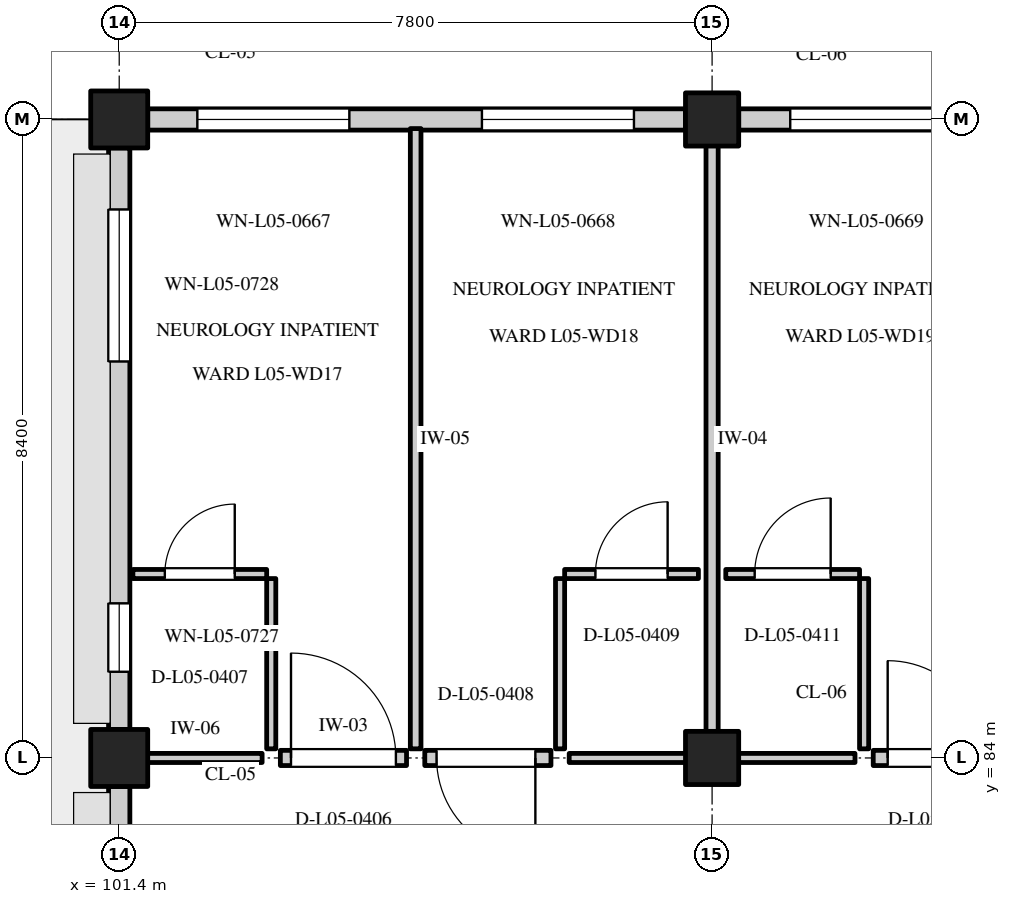
"""IFC4 building model, lengths in metres.
Left out: names, types, materials, properties, quantities, classifications, styles, units other than length and angle.
Written with IfcOpenShell. Run it as: python <this file> out.ifc"""

import sys

from ifc_helpers import new_model, si_unit, direction, frame, frame_2d, origin, origin_2d, place, context, subcontext, project, spatial, rectangle, extrude, element, fill, save


model = new_model("IFC4")
c1 = context("Model", 3, precision=1e-05, world=origin(), true_north=direction((0.0, 1.0)))
c2 = subcontext(c1, "Body", "Model", "MODEL_VIEW")
j1 = project(units=[si_unit("LENGTHUNIT", "METRE"), si_unit("PLANEANGLEUNIT", "RADIAN")], contexts=[c1])
p1 = place(None, origin())
s1 = spatial("IfcSite", under=j1, at=p1, CompositionType="ELEMENT")
p2 = place(p1, origin())
s2 = spatial("IfcBuilding", under=s1, at=p2, CompositionType="ELEMENT")
p3 = place(p2, frame((0.0, 0.0, 22.2)))
s3 = spatial("IfcBuildingStorey", under=s2, at=p3, CompositionType="ELEMENT", Elevation=22.2)
for number, where, z_axis, x_axis in (
    (1, (101.4, 84.0, 0.0), (0.0, 0.0, 1.0), (1.0, 0.0, 0.0)),
    (2, (101.4, 92.4, 0.0), (0.0, 0.0, 1.0), (1.0, 0.0, 0.0)),
):
    element("IfcColumn", number, at=place(p3, frame(where, z_axis=z_axis, x_axis=x_axis)), inside=s3, PredefinedType="COLUMN", context=c2, shape_type="SweptSolid", body=[
        extrude(rectangle(XDim=0.75, YDim=0.75, at=origin_2d()), origin(), (0.0, 0.0, 1.0), 3.9),
    ])
for number, where, z_axis, x_axis in (
    (3, (109.2, 84.0, 0.0), (0.0, 0.0, 1.0), (1.0, 0.0, 0.0)),
    (4, (109.2, 92.4, 0.0), (0.0, 0.0, 1.0), (1.0, 0.0, 0.0)),
):
    element("IfcColumn", number, at=place(p3, frame(where, z_axis=z_axis, x_axis=x_axis)), inside=s3, PredefinedType="COLUMN", context=c2, shape_type="SweptSolid", body=[
        extrude(rectangle(XDim=0.7, YDim=0.7, at=origin_2d()), origin(), (0.0, 0.0, 1.0), 3.9),
    ])
p4 = place(p3, frame((101.775, 92.4, 0.0), z_axis=(0.0, 0.0, 1.0), x_axis=(1.0, 0.0, 0.0)))
e5 = element("IfcWall", 5, at=p4, inside=s3, PredefinedType="STANDARD", context=c2, shape_type="SweptSolid", body=[
    extrude(rectangle(XDim=7.075, YDim=0.28, at=frame_2d((3.538, 0.0))), origin(), (0.0, 0.0, 1.0), 3.05),
])
p5 = place(p4, frame((0.653, 0.0, 0.8)))
e6 = element("IfcOpeningElement", 6, at=p5, cuts=e5, PredefinedType="OPENING", context=c2, shape_type="SweptSolid", body=[
    extrude(rectangle(XDim=2.0, YDim=1.55, at=frame_2d((1.0, 0.775))), frame((0.0, 0.152, 0.0), z_axis=(0.0, -1.0, 0.0), x_axis=(1.0, 0.0, 0.0)), (0.0, 0.0, 1.0), 0.304),
])
p6 = place(p4, frame((4.397, 0.0, 0.8)))
e7 = element("IfcOpeningElement", 7, at=p6, cuts=e5, PredefinedType="OPENING", context=c2, shape_type="SweptSolid", body=[
    extrude(rectangle(XDim=2.0, YDim=1.55, at=frame_2d((1.0, 0.775))), frame((0.0, 0.152, 0.0), z_axis=(0.0, -1.0, 0.0), x_axis=(1.0, 0.0, 0.0)), (0.0, 0.0, 1.0), 0.304),
])
p7 = place(p3, frame((109.55, 92.4, 0.0), z_axis=(0.0, 0.0, 1.0), x_axis=(1.0, 0.0, 0.0)))
e8 = element("IfcWall", 8, at=p7, inside=s3, PredefinedType="STANDARD", context=c2, shape_type="SweptSolid", body=[
    extrude(rectangle(XDim=7.1, YDim=0.28, at=frame_2d((3.55, 0.0))), origin(), (0.0, 0.0, 1.0), 3.05),
])
p8 = place(p7, frame((0.678, 0.0, 0.8)))
e9 = element("IfcOpeningElement", 9, at=p8, cuts=e8, PredefinedType="OPENING", context=c2, shape_type="SweptSolid", body=[
    extrude(rectangle(XDim=2.0, YDim=1.45, at=frame_2d((1.0, 0.725))), frame((0.0, 0.152, 0.0), z_axis=(0.0, -1.0, 0.0), x_axis=(1.0, 0.0, 0.0)), (0.0, 0.0, 1.0), 0.304),
])
p9 = place(p7, frame((4.422, 0.0, 0.8)))
e10 = element("IfcOpeningElement", 10, at=p9, cuts=e8, PredefinedType="OPENING", context=c2, shape_type="SweptSolid", body=[
    extrude(rectangle(XDim=2.0, YDim=1.45, at=frame_2d((1.0, 0.725))), frame((0.0, 0.152, 0.0), z_axis=(0.0, -1.0, 0.0), x_axis=(1.0, 0.0, 0.0)), (0.0, 0.0, 1.0), 0.304),
])
p10 = place(p3, frame((101.4, 75.975, 0.0), z_axis=(0.0, 0.0, 1.0), x_axis=(0.0, 1.0, 0.0)))
e11 = element("IfcWall", 11, at=p10, inside=s3, PredefinedType="STANDARD", context=c2, shape_type="SweptSolid", body=[
    extrude(rectangle(XDim=7.65, YDim=0.28, at=frame_2d((3.825, 0.0))), origin(), (0.0, 0.0, 1.0), 2.95),
])
p11 = place(p10, frame((0.809, 0.0, 0.8)))
e12 = element("IfcOpeningElement", 12, at=p11, cuts=e11, PredefinedType="OPENING", context=c2, shape_type="SweptSolid", body=[
    extrude(rectangle(XDim=2.0, YDim=1.75, at=frame_2d((1.0, 0.875))), frame((0.0, 0.152, 0.0), z_axis=(0.0, -1.0, 0.0), x_axis=(1.0, 0.0, 0.0)), (0.0, 0.0, 1.0), 0.304),
])
p12 = place(p10, frame((4.841, 0.0, 0.8)))
e13 = element("IfcOpeningElement", 13, at=p12, cuts=e11, PredefinedType="OPENING", context=c2, shape_type="SweptSolid", body=[
    extrude(rectangle(XDim=2.0, YDim=1.75, at=frame_2d((1.0, 0.875))), frame((0.0, 0.152, 0.0), z_axis=(0.0, -1.0, 0.0), x_axis=(1.0, 0.0, 0.0)), (0.0, 0.0, 1.0), 0.304),
])
p13 = place(p3, frame((101.4, 84.375, 0.0), z_axis=(0.0, 0.0, 1.0), x_axis=(0.0, 1.0, 0.0)))
e14 = element("IfcWall", 14, at=p13, inside=s3, PredefinedType="STANDARD", context=c2, shape_type="SweptSolid", body=[
    extrude(rectangle(XDim=7.65, YDim=0.28, at=frame_2d((3.825, 0.0))), origin(), (0.0, 0.0, 1.0), 2.95),
])
p14 = place(p13, frame((0.759, 0.0, 0.8)))
e15 = element("IfcOpeningElement", 15, at=p14, cuts=e14, PredefinedType="OPENING", context=c2, shape_type="SweptSolid", body=[
    extrude(rectangle(XDim=0.9, YDim=1.3, at=frame_2d((0.45, 0.65))), frame((0.0, 0.152, 0.0), z_axis=(0.0, -1.0, 0.0), x_axis=(1.0, 0.0, 0.0)), (0.0, 0.0, 1.0), 0.304),
])
p15 = place(p13, frame((4.841, 0.0, 0.8)))
e16 = element("IfcOpeningElement", 16, at=p15, cuts=e14, PredefinedType="OPENING", context=c2, shape_type="SweptSolid", body=[
    extrude(rectangle(XDim=2.0, YDim=1.65, at=frame_2d((1.0, 0.825))), frame((0.0, 0.152, 0.0), z_axis=(0.0, -1.0, 0.0), x_axis=(1.0, 0.0, 0.0)), (0.0, 0.0, 1.0), 0.304),
])
p16 = place(p3, frame((105.3, 84.12, 0.0), z_axis=(0.0, 0.0, 1.0), x_axis=(0.0, 1.0, 0.0)))
e17 = element("IfcWall", 17, at=p16, inside=s3, PredefinedType="PARTITIONING", context=c2, shape_type="SweptSolid", body=[
    extrude(rectangle(XDim=8.16, YDim=0.14, at=frame_2d((4.08, 0.0))), origin(), (0.0, 0.0, 1.0), 3.58),
])
p17 = place(p3, frame((103.52, 84.0, 0.0), z_axis=(0.0, 0.0, 1.0), x_axis=(1.0, 0.0, 0.0)))
e18 = element("IfcWall", 18, at=p17, inside=s3, PredefinedType="STANDARD", context=c2, shape_type="SweptSolid", body=[
    extrude(rectangle(XDim=1.66, YDim=0.2, at=frame_2d((0.83, 0.0))), origin(), (0.0, 0.0, 1.0), 2.95),
])
p18 = place(p17, frame((0.14, 0.0, 0.0)))
e19 = element("IfcOpeningElement", 19, at=p18, cuts=e18, PredefinedType="OPENING", context=c2, shape_type="SweptSolid", body=[
    extrude(rectangle(XDim=1.38, YDim=2.2, at=frame_2d((0.69, 1.1))), frame((0.0, 0.112, 0.0), z_axis=(0.0, -1.0, 0.0), x_axis=(1.0, 0.0, 0.0)), (0.0, 0.0, 1.0), 0.224),
])
p19 = place(p3, frame((101.52, 84.0, 0.0), z_axis=(0.0, 0.0, 1.0), x_axis=(1.0, 0.0, 0.0)))
e20 = element("IfcWall", 20, at=p19, inside=s3, PredefinedType="PARTITIONING", context=c2, shape_type="SweptSolid", body=[
    extrude(rectangle(XDim=1.76, YDim=0.12, at=frame_2d((0.88, 0.0))), origin(), (0.0, 0.0, 1.0), 2.95),
])
p20 = place(p3, frame((103.4, 84.12, 0.0), z_axis=(0.0, 0.0, 1.0), x_axis=(0.0, 1.0, 0.0)))
e21 = element("IfcWall", 21, at=p20, inside=s3, PredefinedType="PARTITIONING", context=c2, shape_type="SweptSolid", body=[
    extrude(rectangle(XDim=2.24, YDim=0.12, at=frame_2d((1.12, 0.0))), origin(), (0.0, 0.0, 1.0), 3.58),
])
p21 = place(p3, frame((101.58, 86.42, 0.0), z_axis=(0.0, 0.0, 1.0), x_axis=(1.0, 0.0, 0.0)))
e22 = element("IfcWall", 22, at=p21, inside=s3, PredefinedType="PARTITIONING", context=c2, shape_type="SweptSolid", body=[
    extrude(rectangle(XDim=1.76, YDim=0.12, at=frame_2d((0.88, 0.0))), origin(), (0.0, 0.0, 1.0), 3.58),
])
p22 = place(p21, frame((0.42, 0.0, 0.0)))
e23 = element("IfcOpeningElement", 23, at=p22, cuts=e22, PredefinedType="OPENING", context=c2, shape_type="SweptSolid", body=[
    extrude(rectangle(XDim=0.92, YDim=2.08, at=frame_2d((0.46, 1.04))), frame((0.0, 0.072, 0.0), z_axis=(0.0, -1.0, 0.0), x_axis=(1.0, 0.0, 0.0)), (0.0, 0.0, 1.0), 0.144),
])
p23 = place(p3, frame((109.2, 84.12, 0.0), z_axis=(0.0, 0.0, 1.0), x_axis=(0.0, 1.0, 0.0)))
e24 = element("IfcWall", 24, at=p23, inside=s3, PredefinedType="PARTITIONING", context=c2, shape_type="SweptSolid", body=[
    extrude(rectangle(XDim=8.16, YDim=0.16, at=frame_2d((4.08, 0.0))), origin(), (0.0, 0.0, 1.0), 3.58),
])
p24 = place(p3, frame((105.42, 84.0, 0.0), z_axis=(0.0, 0.0, 1.0), x_axis=(1.0, 0.0, 0.0)))
e25 = element("IfcWall", 25, at=p24, inside=s3, PredefinedType="STANDARD", context=c2, shape_type="SweptSolid", body=[
    extrude(rectangle(XDim=1.66, YDim=0.2, at=frame_2d((0.83, 0.0))), origin(), (0.0, 0.0, 1.0), 2.95),
])
p25 = place(p24, frame((0.155, 0.0, 0.0)))
e26 = element("IfcOpeningElement", 26, at=p25, cuts=e25, PredefinedType="OPENING", context=c2, shape_type="SweptSolid", body=[
    extrude(rectangle(XDim=1.3, YDim=2.15, at=frame_2d((0.65, 1.075))), frame((0.0, 0.112, 0.0), z_axis=(0.0, -1.0, 0.0), x_axis=(1.0, 0.0, 0.0)), (0.0, 0.0, 1.0), 0.224),
])
p26 = place(p3, frame((107.32, 84.0, 0.0), z_axis=(0.0, 0.0, 1.0), x_axis=(1.0, 0.0, 0.0)))
e27 = element("IfcWall", 27, at=p26, inside=s3, PredefinedType="PARTITIONING", context=c2, shape_type="SweptSolid", body=[
    extrude(rectangle(XDim=1.76, YDim=0.12, at=frame_2d((0.88, 0.0))), origin(), (0.0, 0.0, 1.0), 2.95),
])
p27 = place(p3, frame((107.2, 84.12, 0.0), z_axis=(0.0, 0.0, 1.0), x_axis=(0.0, 1.0, 0.0)))
e28 = element("IfcWall", 28, at=p27, inside=s3, PredefinedType="PARTITIONING", context=c2, shape_type="SweptSolid", body=[
    extrude(rectangle(XDim=2.24, YDim=0.12, at=frame_2d((1.12, 0.0))), origin(), (0.0, 0.0, 1.0), 3.58),
])
p28 = place(p3, frame((107.26, 86.42, 0.0), z_axis=(0.0, 0.0, 1.0), x_axis=(1.0, 0.0, 0.0)))
e29 = element("IfcWall", 29, at=p28, inside=s3, PredefinedType="PARTITIONING", context=c2, shape_type="SweptSolid", body=[
    extrude(rectangle(XDim=1.76, YDim=0.12, at=frame_2d((0.88, 0.0))), origin(), (0.0, 0.0, 1.0), 3.58),
])
p29 = place(p28, frame((0.405, 0.0, 0.0)))
e30 = element("IfcOpeningElement", 30, at=p29, cuts=e29, PredefinedType="OPENING", context=c2, shape_type="SweptSolid", body=[
    extrude(rectangle(XDim=0.95, YDim=2.1, at=frame_2d((0.475, 1.05))), frame((0.0, 0.072, 0.0), z_axis=(0.0, -1.0, 0.0), x_axis=(1.0, 0.0, 0.0)), (0.0, 0.0, 1.0), 0.144),
])
p30 = place(p3, frame((111.32, 84.0, 0.0), z_axis=(0.0, 0.0, 1.0), x_axis=(1.0, 0.0, 0.0)))
e31 = element("IfcWall", 31, at=p30, inside=s3, PredefinedType="STANDARD", context=c2, shape_type="SweptSolid", body=[
    extrude(rectangle(XDim=1.66, YDim=0.2, at=frame_2d((0.83, 0.0))), origin(), (0.0, 0.0, 1.0), 2.95),
])
p31 = place(p30, frame((0.19, 0.0, 0.0)))
e32 = element("IfcOpeningElement", 32, at=p31, cuts=e31, PredefinedType="OPENING", context=c2, shape_type="SweptSolid", body=[
    extrude(rectangle(XDim=1.28, YDim=2.15, at=frame_2d((0.64, 1.075))), frame((0.0, 0.112, 0.0), z_axis=(0.0, -1.0, 0.0), x_axis=(1.0, 0.0, 0.0)), (0.0, 0.0, 1.0), 0.224),
])
p32 = place(p3, frame((109.32, 84.0, 0.0), z_axis=(0.0, 0.0, 1.0), x_axis=(1.0, 0.0, 0.0)))
e33 = element("IfcWall", 33, at=p32, inside=s3, PredefinedType="PARTITIONING", context=c2, shape_type="SweptSolid", body=[
    extrude(rectangle(XDim=1.76, YDim=0.12, at=frame_2d((0.88, 0.0))), origin(), (0.0, 0.0, 1.0), 2.95),
])
p33 = place(p3, frame((111.2, 84.12, 0.0), z_axis=(0.0, 0.0, 1.0), x_axis=(0.0, 1.0, 0.0)))
e34 = element("IfcWall", 34, at=p33, inside=s3, PredefinedType="PARTITIONING", context=c2, shape_type="SweptSolid", body=[
    extrude(rectangle(XDim=2.24, YDim=0.12, at=frame_2d((1.12, 0.0))), origin(), (0.0, 0.0, 1.0), 3.58),
])
p34 = place(p3, frame((109.38, 86.42, 0.0), z_axis=(0.0, 0.0, 1.0), x_axis=(1.0, 0.0, 0.0)))
e35 = element("IfcWall", 35, at=p34, inside=s3, PredefinedType="PARTITIONING", context=c2, shape_type="SweptSolid", body=[
    extrude(rectangle(XDim=1.76, YDim=0.12, at=frame_2d((0.88, 0.0))), origin(), (0.0, 0.0, 1.0), 3.58),
])
p35 = place(p34, frame((0.38, 0.0, 0.0)))
e36 = element("IfcOpeningElement", 36, at=p35, cuts=e35, PredefinedType="OPENING", context=c2, shape_type="SweptSolid", body=[
    extrude(rectangle(XDim=1.0, YDim=2.1, at=frame_2d((0.5, 1.05))), frame((0.0, 0.072, 0.0), z_axis=(0.0, -1.0, 0.0), x_axis=(1.0, 0.0, 0.0)), (0.0, 0.0, 1.0), 0.144),
])
p36 = place(p5, origin())
e37 = element("IfcWindow", 37, at=p36, inside=s3, PartitioningType="DOUBLE_PANEL_VERTICAL", PredefinedType="WINDOW", context=c2, shape_type="SweptSolid", body=[
    extrude(rectangle(XDim=2.0, YDim=1.55, at=frame_2d((1.0, 0.775))), frame((0.0, 0.03, 0.0), z_axis=(0.0, -1.0, 0.0), x_axis=(1.0, 0.0, 0.0)), (0.0, 0.0, 1.0), 0.06),
])
fill(e6, e37)
p37 = place(p6, origin())
e38 = element("IfcWindow", 38, at=p37, inside=s3, PartitioningType="DOUBLE_PANEL_VERTICAL", PredefinedType="WINDOW", context=c2, shape_type="SweptSolid", body=[
    extrude(rectangle(XDim=2.0, YDim=1.55, at=frame_2d((1.0, 0.775))), frame((0.0, 0.03, 0.0), z_axis=(0.0, -1.0, 0.0), x_axis=(1.0, 0.0, 0.0)), (0.0, 0.0, 1.0), 0.06),
])
fill(e7, e38)
p38 = place(p8, origin())
e39 = element("IfcWindow", 39, at=p38, inside=s3, PartitioningType="DOUBLE_PANEL_VERTICAL", PredefinedType="WINDOW", context=c2, shape_type="SweptSolid", body=[
    extrude(rectangle(XDim=2.0, YDim=1.45, at=frame_2d((1.0, 0.725))), frame((0.0, 0.03, 0.0), z_axis=(0.0, -1.0, 0.0), x_axis=(1.0, 0.0, 0.0)), (0.0, 0.0, 1.0), 0.06),
])
fill(e9, e39)
p39 = place(p14, origin())
e40 = element("IfcWindow", 40, at=p39, inside=s3, PartitioningType="SINGLE_PANEL", PredefinedType="WINDOW", context=c2, shape_type="SweptSolid", body=[
    extrude(rectangle(XDim=0.9, YDim=1.3, at=frame_2d((0.45, 0.65))), frame((0.0, 0.03, 0.0), z_axis=(0.0, -1.0, 0.0), x_axis=(1.0, 0.0, 0.0)), (0.0, 0.0, 1.0), 0.06),
])
fill(e15, e40)
p40 = place(p15, origin())
e41 = element("IfcWindow", 41, at=p40, inside=s3, PartitioningType="DOUBLE_PANEL_VERTICAL", PredefinedType="WINDOW", context=c2, shape_type="SweptSolid", body=[
    extrude(rectangle(XDim=2.0, YDim=1.65, at=frame_2d((1.0, 0.825))), frame((0.0, 0.03, 0.0), z_axis=(0.0, -1.0, 0.0), x_axis=(1.0, 0.0, 0.0)), (0.0, 0.0, 1.0), 0.06),
])
fill(e16, e41)
p41 = place(p18, origin())
e42 = element("IfcDoor", 42, at=p41, inside=s3, OperationType="SINGLE_SWING_LEFT", PredefinedType="DOOR", context=c2, shape_type="SweptSolid", body=[
    extrude(rectangle(XDim=1.38, YDim=2.2, at=frame_2d((0.69, 1.1))), frame((0.0, 0.025, 0.0), z_axis=(0.0, -1.0, 0.0), x_axis=(1.0, 0.0, 0.0)), (0.0, 0.0, 1.0), 0.05),
])
fill(e19, e42)
p42 = place(p22, frame((0.92, 0.0, 0.0), z_axis=(0.0, 0.0, 1.0), x_axis=(-1.0, 0.0, 0.0)))
e43 = element("IfcDoor", 43, at=p42, inside=s3, OperationType="SINGLE_SWING_LEFT", PredefinedType="DOOR", context=c2, shape_type="SweptSolid", body=[
    extrude(rectangle(XDim=0.92, YDim=2.08, at=frame_2d((0.46, 1.04))), frame((0.0, 0.025, 0.0), z_axis=(0.0, -1.0, 0.0), x_axis=(1.0, 0.0, 0.0)), (0.0, 0.0, 1.0), 0.05),
])
fill(e23, e43)
p43 = place(p25, origin())
e44 = element("IfcDoor", 44, at=p43, inside=s3, OperationType="SINGLE_SWING_RIGHT", PredefinedType="DOOR", context=c2, shape_type="SweptSolid", body=[
    extrude(rectangle(XDim=1.3, YDim=2.15, at=frame_2d((0.65, 1.075))), frame((0.0, 0.025, 0.0), z_axis=(0.0, -1.0, 0.0), x_axis=(1.0, 0.0, 0.0)), (0.0, 0.0, 1.0), 0.05),
])
fill(e26, e44)
p44 = place(p29, frame((0.95, 0.0, 0.0), z_axis=(0.0, 0.0, 1.0), x_axis=(-1.0, 0.0, 0.0)))
e45 = element("IfcDoor", 45, at=p44, inside=s3, OperationType="SINGLE_SWING_LEFT", PredefinedType="DOOR", context=c2, shape_type="SweptSolid", body=[
    extrude(rectangle(XDim=0.95, YDim=2.1, at=frame_2d((0.475, 1.05))), frame((0.0, 0.025, 0.0), z_axis=(0.0, -1.0, 0.0), x_axis=(1.0, 0.0, 0.0)), (0.0, 0.0, 1.0), 0.05),
])
fill(e30, e45)
p45 = place(p31, origin())
e46 = element("IfcDoor", 46, at=p45, inside=s3, OperationType="SINGLE_SWING_LEFT", PredefinedType="DOOR", context=c2, shape_type="SweptSolid", body=[
    extrude(rectangle(XDim=1.28, YDim=2.15, at=frame_2d((0.64, 1.075))), frame((0.0, 0.025, 0.0), z_axis=(0.0, -1.0, 0.0), x_axis=(1.0, 0.0, 0.0)), (0.0, 0.0, 1.0), 0.05),
])
fill(e32, e46)
p46 = place(p35, frame((1.0, 0.0, 0.0), z_axis=(0.0, 0.0, 1.0), x_axis=(-1.0, 0.0, 0.0)))
e47 = element("IfcDoor", 47, at=p46, inside=s3, OperationType="SINGLE_SWING_LEFT", PredefinedType="DOOR", context=c2, shape_type="SweptSolid", body=[
    extrude(rectangle(XDim=1.0, YDim=2.1, at=frame_2d((0.5, 1.05))), frame((0.0, 0.025, 0.0), z_axis=(0.0, -1.0, 0.0), x_axis=(1.0, 0.0, 0.0)), (0.0, 0.0, 1.0), 0.05),
])
fill(e36, e47)
save(model, sys.argv[1])
